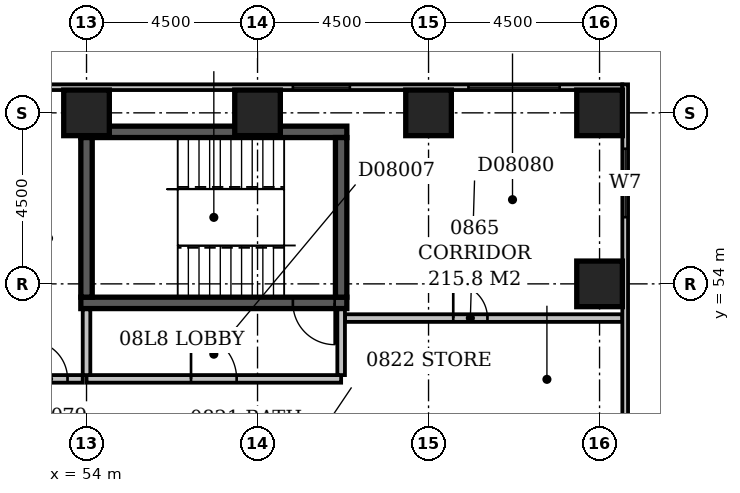
"""IFC4 building model, lengths in metres.
Left out: names, types, materials, properties, quantities, classifications, styles, units other than length and angle.
Written with IfcOpenShell. Run it as: python <this file> out.ifc"""

import sys

from ifc_helpers import new_model, si_unit, direction, frame, frame_2d, origin, origin_2d, place, context, subcontext, project, spatial, rectangle, extrude, element, fill, save


model = new_model("IFC4")
c1 = context("Model", 3, precision=1e-05, world=origin(), true_north=direction((0.0, 1.0)))
c2 = subcontext(c1, "Body", "Model", "MODEL_VIEW")
j1 = project(units=[si_unit("LENGTHUNIT", "METRE"), si_unit("PLANEANGLEUNIT", "RADIAN")], contexts=[c1])
p1 = place(None, origin())
s1 = spatial("IfcSite", under=j1, at=p1, CompositionType="ELEMENT")
p2 = place(p1, origin())
s2 = spatial("IfcBuilding", under=s1, at=p2, CompositionType="ELEMENT")
p3 = place(p2, frame((0.0, 0.0, 39.8)))
s3 = spatial("IfcBuildingStorey", under=s2, at=p3, CompositionType="ELEMENT", Elevation=39.8)
p4 = place(p3, frame((53.85, 53.5, -0.3), z_axis=(0.0, 0.0, 1.0), x_axis=(1.0, 0.0, 0.0)))
e1 = element("IfcWall", 1, at=p4, inside=s3, PredefinedType="SHEAR", context=c2, shape_type="SweptSolid", body=[
    extrude(rectangle(XDim=7.0, YDim=0.3, at=frame_2d((3.5, 0.0))), origin(), (0.0, 0.0, 1.0), 3.6),
])
p5 = place(p4, frame((5.58, 0.0, 0.3)))
e2 = element("IfcOpeningElement", 2, at=p5, cuts=e1, PredefinedType="OPENING", context=c2, shape_type="SweptSolid", body=[
    extrude(rectangle(XDim=1.1, YDim=2.1, at=frame_2d((0.55, 1.05))), frame((0.0, 0.162, 0.0), z_axis=(0.0, -1.0, 0.0), x_axis=(1.0, 0.0, 0.0)), (0.0, 0.0, 1.0), 0.324),
])
p6 = place(p3, frame((53.85, 58.0, -0.3), z_axis=(0.0, 0.0, 1.0), x_axis=(1.0, 0.0, 0.0)))
e3 = element("IfcWall", 3, at=p6, inside=s3, PredefinedType="SHEAR", context=c2, shape_type="SweptSolid", body=[
    extrude(rectangle(XDim=7.0, YDim=0.3, at=frame_2d((3.5, 0.0))), origin(), (0.0, 0.0, 1.0), 3.6),
])
for number, where, z_axis, x_axis in (
    (4, (54.0, 53.65, -0.3), (0.0, 0.0, 1.0), (0.0, 1.0, 0.0)),
    (5, (60.7, 53.65, -0.3), (0.0, 0.0, 1.0), (0.0, 1.0, 0.0)),
):
    element("IfcWall", number, at=place(p3, frame(where, z_axis=z_axis, x_axis=x_axis)), inside=s3, PredefinedType="SHEAR", context=c2, shape_type="SweptSolid", body=[
        extrude(rectangle(XDim=4.2, YDim=0.3, at=frame_2d((2.1, 0.0))), origin(), (0.0, 0.0, 1.0), 3.6),
    ])
for number, where, z_axis, x_axis in (
    (6, (67.5, 54.0, -0.3), (0.0, 0.0, 1.0), (1.0, 0.0, 0.0)),
    (7, (54.0, 58.5, -0.3), (0.0, 0.0, 1.0), (1.0, 0.0, 0.0)),
    (8, (58.5, 58.5, -0.3), (0.0, 0.0, 1.0), (1.0, 0.0, 0.0)),
    (9, (63.0, 58.5, -0.3), (0.0, 0.0, 1.0), (1.0, 0.0, 0.0)),
    (10, (67.5, 58.5, -0.3), (0.0, 0.0, 1.0), (1.0, 0.0, 0.0)),
):
    element("IfcColumn", number, at=place(p3, frame(where, z_axis=z_axis, x_axis=x_axis)), inside=s3, PredefinedType="COLUMN", context=c2, shape_type="SweptSolid", body=[
        extrude(rectangle(XDim=1.2, YDim=1.2, at=origin_2d()), origin(), (0.0, 0.0, 1.0), 3.6),
    ])
p7 = place(p3, frame((68.175, 35.4, 0.0), z_axis=(0.0, 0.0, 1.0), x_axis=(0.0, 1.0, 0.0)))
e11 = element("IfcWall", 11, at=p7, inside=s3, PredefinedType="STANDARD", context=c2, shape_type="SweptSolid", body=[
    extrude(rectangle(XDim=23.85, YDim=0.15, at=frame_2d((11.925, 0.0))), origin(), (0.0, 0.0, 1.0), 2.7),
])
p8 = place(p7, frame((1.65, 0.0, 0.6)))
e12 = element("IfcOpeningElement", 12, at=p8, cuts=e11, PredefinedType="OPENING", context=c2, shape_type="SweptSolid", body=[
    extrude(rectangle(XDim=2.4, YDim=1.8, at=frame_2d((1.2, 0.9))), frame((0.0, 0.087, 0.0), z_axis=(0.0, -1.0, 0.0), x_axis=(1.0, 0.0, 0.0)), (0.0, 0.0, 1.0), 0.174),
])
p9 = place(p7, frame((20.355, 0.0, 0.6)))
e13 = element("IfcOpeningElement", 13, at=p9, cuts=e11, PredefinedType="OPENING", context=c2, shape_type="SweptSolid", body=[
    extrude(rectangle(XDim=1.8, YDim=1.8, at=frame_2d((0.9, 0.9))), frame((0.0, 0.087, 0.0), z_axis=(0.0, -1.0, 0.0), x_axis=(1.0, 0.0, 0.0)), (0.0, 0.0, 1.0), 0.174),
])
p10 = place(p3, frame((68.1, 59.175, 0.0), z_axis=(0.0, 0.0, 1.0), x_axis=(-1.0, 0.0, 0.0)))
e14 = element("IfcWall", 14, at=p10, inside=s3, PredefinedType="STANDARD", context=c2, shape_type="SweptSolid", body=[
    extrude(rectangle(XDim=68.85, YDim=0.15, at=frame_2d((34.425, 0.0))), origin(), (0.0, 0.0, 1.0), 2.7),
])
p11 = place(p10, frame((1.65, 0.0, 0.6)))
e15 = element("IfcOpeningElement", 15, at=p11, cuts=e14, PredefinedType="OPENING", context=c2, shape_type="SweptSolid", body=[
    extrude(rectangle(XDim=2.4, YDim=1.8, at=frame_2d((1.2, 0.9))), frame((0.0, 0.087, 0.0), z_axis=(0.0, -1.0, 0.0), x_axis=(1.0, 0.0, 0.0)), (0.0, 0.0, 1.0), 0.174),
])
p12 = place(p10, frame((7.17, 0.0, 0.6)))
e16 = element("IfcOpeningElement", 16, at=p12, cuts=e14, PredefinedType="OPENING", context=c2, shape_type="SweptSolid", body=[
    extrude(rectangle(XDim=1.5, YDim=1.8, at=frame_2d((0.75, 0.9))), frame((0.0, 0.087, 0.0), z_axis=(0.0, -1.0, 0.0), x_axis=(1.0, 0.0, 0.0)), (0.0, 0.0, 1.0), 0.174),
])
p13 = place(p3, frame((54.0, 51.5, 0.0), z_axis=(0.0, 0.0, 1.0), x_axis=(1.0, 0.0, 0.0)))
e17 = element("IfcWall", 17, at=p13, inside=s3, PredefinedType="PARTITIONING", context=c2, shape_type="SweptSolid", body=[
    extrude(rectangle(XDim=6.7, YDim=0.2, at=frame_2d((3.35, 0.0))), origin(), (0.0, 0.0, 1.0), 3.3),
])
p14 = place(p13, frame((2.75, 0.0, 0.0)))
e18 = element("IfcOpeningElement", 18, at=p14, cuts=e17, PredefinedType="OPENING", context=c2, shape_type="SweptSolid", body=[
    extrude(rectangle(XDim=1.2, YDim=2.1, at=frame_2d((0.6, 1.05))), frame((0.0, 0.112, 0.0), z_axis=(0.0, -1.0, 0.0), x_axis=(1.0, 0.0, 0.0)), (0.0, 0.0, 1.0), 0.224),
])
p15 = place(p3, frame((60.7, 51.6, 0.0), z_axis=(0.0, 0.0, 1.0), x_axis=(0.0, 1.0, 0.0)))
e19 = element("IfcWall", 19, at=p15, inside=s3, PredefinedType="PARTITIONING", context=c2, shape_type="SweptSolid", body=[
    extrude(rectangle(XDim=1.73, YDim=0.2, at=frame_2d((0.865, 0.0))), origin(), (0.0, 0.0, 1.0), 3.3),
])
p16 = place(p3, frame((54.0, 51.6, 0.0), z_axis=(0.0, 0.0, 1.0), x_axis=(0.0, 1.0, 0.0)))
e20 = element("IfcWall", 20, at=p16, inside=s3, PredefinedType="PARTITIONING", context=c2, shape_type="SweptSolid", body=[
    extrude(rectangle(XDim=1.73, YDim=0.2, at=frame_2d((0.865, 0.0))), origin(), (0.0, 0.0, 1.0), 2.6),
])
p17 = place(p3, frame((52.1, 51.5, 0.0), z_axis=(0.0, 0.0, 1.0), x_axis=(1.0, 0.0, 0.0)))
e21 = element("IfcWall", 21, at=p17, inside=s3, PredefinedType="PARTITIONING", context=c2, shape_type="SweptSolid", body=[
    extrude(rectangle(XDim=1.8, YDim=0.2, at=frame_2d((0.9, 0.0))), origin(), (0.0, 0.0, 1.0), 3.3),
])
p18 = place(p17, frame((0.4, 0.0, 0.0)))
e22 = element("IfcOpeningElement", 22, at=p18, cuts=e21, PredefinedType="OPENING", context=c2, shape_type="SweptSolid", body=[
    extrude(rectangle(XDim=1.0, YDim=2.1, at=frame_2d((0.5, 1.05))), frame((0.0, 0.112, 0.0), z_axis=(0.0, -1.0, 0.0), x_axis=(1.0, 0.0, 0.0)), (0.0, 0.0, 1.0), 0.224),
])
p19 = place(p3, frame((60.8, 53.1, 0.0), z_axis=(0.0, 0.0, 1.0), x_axis=(1.0, 0.0, 0.0)))
e23 = element("IfcWall", 23, at=p19, inside=s3, PredefinedType="PARTITIONING", context=c2, shape_type="SweptSolid", body=[
    extrude(rectangle(XDim=7.3, YDim=0.2, at=frame_2d((3.65, 0.0))), origin(), (0.0, 0.0, 1.0), 3.3),
])
p20 = place(p19, frame((2.85, 0.0, 0.0)))
e24 = element("IfcOpeningElement", 24, at=p20, cuts=e23, PredefinedType="OPENING", context=c2, shape_type="SweptSolid", body=[
    extrude(rectangle(XDim=0.9, YDim=2.1, at=frame_2d((0.45, 1.05))), frame((0.0, 0.112, 0.0), z_axis=(0.0, -1.0, 0.0), x_axis=(1.0, 0.0, 0.0)), (0.0, 0.0, 1.0), 0.224),
])
p21 = place(p9, origin())
e25 = element("IfcWindow", 25, at=p21, inside=s3, PartitioningType="SINGLE_PANEL", PredefinedType="WINDOW", context=c2, shape_type="SweptSolid", body=[
    extrude(rectangle(XDim=1.8, YDim=1.8, at=frame_2d((0.9, 0.9))), frame((0.0, 0.03, 0.0), z_axis=(0.0, -1.0, 0.0), x_axis=(1.0, 0.0, 0.0)), (0.0, 0.0, 1.0), 0.06),
])
fill(e13, e25)
p22 = place(p11, origin())
e26 = element("IfcWindow", 26, at=p22, inside=s3, PartitioningType="SINGLE_PANEL", PredefinedType="WINDOW", context=c2, shape_type="SweptSolid", body=[
    extrude(rectangle(XDim=2.4, YDim=1.8, at=frame_2d((1.2, 0.9))), frame((0.0, 0.03, 0.0), z_axis=(0.0, -1.0, 0.0), x_axis=(1.0, 0.0, 0.0)), (0.0, 0.0, 1.0), 0.06),
])
fill(e15, e26)
p23 = place(p12, origin())
e27 = element("IfcWindow", 27, at=p23, inside=s3, PartitioningType="SINGLE_PANEL", PredefinedType="WINDOW", context=c2, shape_type="SweptSolid", body=[
    extrude(rectangle(XDim=1.5, YDim=1.8, at=frame_2d((0.75, 0.9))), frame((0.0, 0.03, 0.0), z_axis=(0.0, -1.0, 0.0), x_axis=(1.0, 0.0, 0.0)), (0.0, 0.0, 1.0), 0.06),
])
fill(e16, e27)
p24 = place(p14, origin())
e28 = element("IfcDoor", 28, at=p24, inside=s3, OperationType="SINGLE_SWING_LEFT", PredefinedType="DOOR", context=c2, shape_type="SweptSolid", body=[
    extrude(rectangle(XDim=1.2, YDim=2.1, at=frame_2d((0.6, 1.05))), frame((0.0, 0.025, 0.0), z_axis=(0.0, -1.0, 0.0), x_axis=(1.0, 0.0, 0.0)), (0.0, 0.0, 1.0), 0.05),
])
fill(e18, e28)
p25 = place(p5, origin())
e29 = element("IfcDoor", 29, at=p25, inside=s3, OperationType="SINGLE_SWING_RIGHT", PredefinedType="DOOR", context=c2, shape_type="SweptSolid", body=[
    extrude(rectangle(XDim=1.1, YDim=2.1, at=frame_2d((0.55, 1.05))), frame((0.0, 0.025, 0.0), z_axis=(0.0, -1.0, 0.0), x_axis=(1.0, 0.0, 0.0)), (0.0, 0.0, 1.0), 0.05),
])
fill(e2, e29)
p26 = place(p18, origin())
e30 = element("IfcDoor", 30, at=p26, inside=s3, OperationType="SINGLE_SWING_LEFT", PredefinedType="DOOR", context=c2, shape_type="SweptSolid", body=[
    extrude(rectangle(XDim=1.0, YDim=2.1, at=frame_2d((0.5, 1.05))), frame((0.0, 0.025, 0.0), z_axis=(0.0, -1.0, 0.0), x_axis=(1.0, 0.0, 0.0)), (0.0, 0.0, 1.0), 0.05),
])
fill(e22, e30)
p27 = place(p20, origin())
e31 = element("IfcDoor", 31, at=p27, inside=s3, OperationType="SINGLE_SWING_LEFT", PredefinedType="DOOR", context=c2, shape_type="SweptSolid", body=[
    extrude(rectangle(XDim=0.9, YDim=2.1, at=frame_2d((0.45, 1.05))), frame((0.0, 0.025, 0.0), z_axis=(0.0, -1.0, 0.0), x_axis=(1.0, 0.0, 0.0)), (0.0, 0.0, 1.0), 0.05),
])
fill(e24, e31)
save(model, sys.argv[1])
